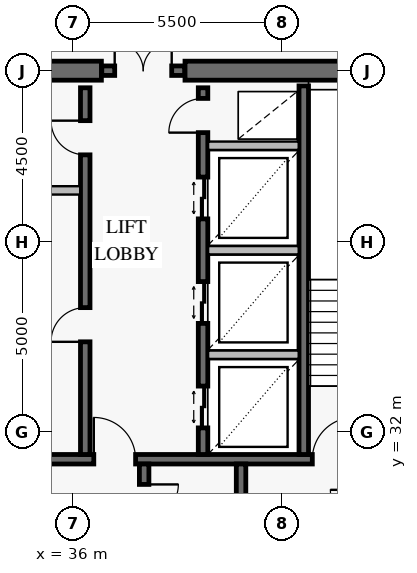
"""IFC4 building model, lengths in metres.
Left out: names, types, materials, properties, quantities, classifications, styles, units other than length and angle.
Written with IfcOpenShell. Run it as: python <this file> out.ifc"""

import sys

from ifc_helpers import new_model, si_unit, direction, frame, frame_2d, origin, place, context, subcontext, project, spatial, rectangle, extrude, element, fill, save


model = new_model("IFC4")
c1 = context("Model", 3, precision=1e-05, world=origin(), true_north=direction((0.0, 1.0)))
c2 = subcontext(c1, "Body", "Model", "MODEL_VIEW")
j1 = project(units=[si_unit("LENGTHUNIT", "METRE"), si_unit("PLANEANGLEUNIT", "RADIAN")], contexts=[c1])
p1 = place(None, origin())
s1 = spatial("IfcSite", under=j1, at=p1, CompositionType="ELEMENT")
p2 = place(p1, origin())
s2 = spatial("IfcBuilding", under=s1, at=p2, CompositionType="ELEMENT")
p3 = place(p2, frame((0.0, 0.0, 319.6)))
s3 = spatial("IfcBuildingStorey", under=s2, at=p3, CompositionType="ELEMENT", Elevation=319.6)
p4 = place(p3, frame((46.75, 41.5, 0.0), z_axis=(0.0, 0.0, 1.0), x_axis=(-1.0, 0.0, 0.0)))
e1 = element("IfcWall", 1, at=p4, inside=s3, PredefinedType="SHEAR", context=c2, shape_type="SweptSolid", body=[
    extrude(rectangle(XDim=7.8, YDim=0.5, at=frame_2d((3.9, 0.0))), origin(), (0.0, 0.0, 1.0), 3.8),
])
p5 = place(p3, frame((36.75, 41.5, 0.0), z_axis=(0.0, 0.0, 1.0), x_axis=(-1.0, 0.0, 0.0)))
e2 = element("IfcWall", 2, at=p5, inside=s3, PredefinedType="SHEAR", context=c2, shape_type="SweptSolid", body=[
    extrude(rectangle(XDim=11.5, YDim=0.5, at=frame_2d((5.75, 0.0))), origin(), (0.0, 0.0, 1.0), 3.8),
])
p6 = place(p5, frame((4.25, 0.0, 0.0)))
e3 = element("IfcOpeningElement", 3, at=p6, cuts=e2, PredefinedType="OPENING", context=c2, shape_type="SweptSolid", body=[
    extrude(rectangle(XDim=1.1, YDim=2.15, at=frame_2d((0.55, 1.075))), frame((0.0, 0.262, 0.0), z_axis=(0.0, -1.0, 0.0), x_axis=(1.0, 0.0, 0.0)), (0.0, 0.0, 1.0), 0.524),
])
p7 = place(p3, frame((36.76, 41.5, 0.0), z_axis=(0.0, 0.0, 1.0), x_axis=(1.0, 0.0, 0.0)))
e4 = element("IfcWall", 4, at=p7, inside=s3, PredefinedType="SOLIDWALL", context=c2, shape_type="SweptSolid", body=[
    extrude(rectangle(XDim=2.18, YDim=0.25, at=frame_2d((1.09, 0.0))), origin(), (0.0, 0.0, 1.0), 3.8),
])
p8 = place(p7, frame((0.34, 0.0, 0.0)))
e5 = element("IfcOpeningElement", 5, at=p8, cuts=e4, PredefinedType="OPENING", context=c2, shape_type="SweptSolid", body=[
    extrude(rectangle(XDim=1.5, YDim=2.15, at=frame_2d((0.75, 1.075))), frame((0.0, 0.137, 0.0), z_axis=(0.0, -1.0, 0.0), x_axis=(1.0, 0.0, 0.0)), (0.0, 0.0, 1.0), 0.274),
])
p9 = place(p3, frame((25.95, 31.275, 0.0), z_axis=(0.0, 0.0, 1.0), x_axis=(1.0, 0.0, 0.0)))
e6 = element("IfcWall", 6, at=p9, inside=s3, PredefinedType="SOLIDWALL", context=c2, shape_type="SweptSolid", body=[
    extrude(rectangle(XDim=20.1, YDim=0.25, at=frame_2d((10.05, 0.0))), origin(), (0.0, 0.0, 1.0), 3.8),
])
p10 = place(p9, frame((2.6, 0.0, 0.0)))
e7 = element("IfcOpeningElement", 7, at=p10, cuts=e6, PredefinedType="OPENING", context=c2, shape_type="SweptSolid", body=[
    extrude(rectangle(XDim=1.1, YDim=2.15, at=frame_2d((0.55, 1.075))), frame((0.0, 0.137, 0.0), z_axis=(0.0, -1.0, 0.0), x_axis=(1.0, 0.0, 0.0)), (0.0, 0.0, 1.0), 0.274),
])
p11 = place(p9, frame((10.6, 0.0, 0.0)))
e8 = element("IfcOpeningElement", 8, at=p11, cuts=e6, PredefinedType="OPENING", context=c2, shape_type="SweptSolid", body=[
    extrude(rectangle(XDim=1.1, YDim=2.15, at=frame_2d((0.55, 1.075))), frame((0.0, 0.137, 0.0), z_axis=(0.0, -1.0, 0.0), x_axis=(1.0, 0.0, 0.0)), (0.0, 0.0, 1.0), 0.274),
])
p12 = place(p9, frame((16.35, 0.0, 0.0)))
e9 = element("IfcOpeningElement", 9, at=p12, cuts=e6, PredefinedType="OPENING", context=c2, shape_type="SweptSolid", body=[
    extrude(rectangle(XDim=1.1, YDim=2.15, at=frame_2d((0.55, 1.075))), frame((0.0, 0.137, 0.0), z_axis=(0.0, -1.0, 0.0), x_axis=(1.0, 0.0, 0.0)), (0.0, 0.0, 1.0), 0.274),
])
p13 = place(p3, frame((42.075, 31.4, 0.0), z_axis=(0.0, 0.0, 1.0), x_axis=(0.0, 1.0, 0.0)))
e10 = element("IfcWall", 10, at=p13, inside=s3, PredefinedType="SOLIDWALL", context=c2, shape_type="SweptSolid", body=[
    extrude(rectangle(XDim=9.7, YDim=0.25, at=frame_2d((4.85, 0.0))), origin(), (0.0, 0.0, 1.0), 3.8),
])
p14 = place(p3, frame((36.325, 31.4, 0.0), z_axis=(0.0, 0.0, 1.0), x_axis=(0.0, 1.0, 0.0)))
e11 = element("IfcWall", 11, at=p14, inside=s3, PredefinedType="SOLIDWALL", context=c2, shape_type="SweptSolid", body=[
    extrude(rectangle(XDim=9.65, YDim=0.25, at=frame_2d((4.825, 0.0))), origin(), (0.0, 0.0, 1.0), 3.8),
])
p15 = place(p14, frame((2.965, 0.0, 0.0)))
e12 = element("IfcOpeningElement", 12, at=p15, cuts=e11, PredefinedType="OPENING", context=c2, shape_type="SweptSolid", body=[
    extrude(rectangle(XDim=0.9, YDim=2.1, at=frame_2d((0.45, 1.05))), frame((0.0, 0.137, 0.0), z_axis=(0.0, -1.0, 0.0), x_axis=(1.0, 0.0, 0.0)), (0.0, 0.0, 1.0), 0.274),
])
p16 = place(p14, frame((7.885, 0.0, 0.0)))
e13 = element("IfcOpeningElement", 13, at=p16, cuts=e11, PredefinedType="OPENING", context=c2, shape_type="SweptSolid", body=[
    extrude(rectangle(XDim=0.9, YDim=2.1, at=frame_2d((0.45, 1.05))), frame((0.0, 0.137, 0.0), z_axis=(0.0, -1.0, 0.0), x_axis=(1.0, 0.0, 0.0)), (0.0, 0.0, 1.0), 0.274),
])
p17 = place(p3, frame((39.425, 31.4, 0.0), z_axis=(0.0, 0.0, 1.0), x_axis=(0.0, 1.0, 0.0)))
e14 = element("IfcWall", 14, at=p17, inside=s3, PredefinedType="SOLIDWALL", context=c2, shape_type="SweptSolid", body=[
    extrude(rectangle(XDim=9.65, YDim=0.25, at=frame_2d((4.825, 0.0))), origin(), (0.0, 0.0, 1.0), 3.8),
])
p18 = place(p17, frame((0.7, 0.0, 0.0)))
e15 = element("IfcOpeningElement", 15, at=p18, cuts=e14, PredefinedType="OPENING", context=c2, shape_type="SweptSolid", body=[
    extrude(rectangle(XDim=1.1, YDim=2.2, at=frame_2d((0.55, 1.1))), frame((0.0, 0.137, 0.0), z_axis=(0.0, -1.0, 0.0), x_axis=(1.0, 0.0, 0.0)), (0.0, 0.0, 1.0), 0.274),
])
p19 = place(p17, frame((3.45, 0.0, 0.0)))
e16 = element("IfcOpeningElement", 16, at=p19, cuts=e14, PredefinedType="OPENING", context=c2, shape_type="SweptSolid", body=[
    extrude(rectangle(XDim=1.1, YDim=2.2, at=frame_2d((0.55, 1.1))), frame((0.0, 0.137, 0.0), z_axis=(0.0, -1.0, 0.0), x_axis=(1.0, 0.0, 0.0)), (0.0, 0.0, 1.0), 0.274),
])
p20 = place(p17, frame((6.2, 0.0, 0.0)))
e17 = element("IfcOpeningElement", 17, at=p20, cuts=e14, PredefinedType="OPENING", context=c2, shape_type="SweptSolid", body=[
    extrude(rectangle(XDim=1.1, YDim=2.2, at=frame_2d((0.55, 1.1))), frame((0.0, 0.137, 0.0), z_axis=(0.0, -1.0, 0.0), x_axis=(1.0, 0.0, 0.0)), (0.0, 0.0, 1.0), 0.274),
])
p21 = place(p17, frame((8.47, 0.0, 0.0)))
e18 = element("IfcOpeningElement", 18, at=p21, cuts=e14, PredefinedType="OPENING", context=c2, shape_type="SweptSolid", body=[
    extrude(rectangle(XDim=0.9, YDim=2.1, at=frame_2d((0.45, 1.05))), frame((0.0, 0.137, 0.0), z_axis=(0.0, -1.0, 0.0), x_axis=(1.0, 0.0, 0.0)), (0.0, 0.0, 1.0), 0.274),
])
p22 = place(p3, frame((37.875, 22.95, 0.0), z_axis=(0.0, 0.0, 1.0), x_axis=(0.0, 1.0, 0.0)))
e19 = element("IfcWall", 19, at=p22, inside=s3, PredefinedType="SOLIDWALL", context=c2, shape_type="SweptSolid", body=[
    extrude(rectangle(XDim=8.2, YDim=0.25, at=frame_2d((4.1, 0.0))), origin(), (0.0, 0.0, 1.0), 3.8),
])
p23 = place(p22, frame((2.562, 0.0, 0.0)))
e20 = element("IfcOpeningElement", 20, at=p23, cuts=e19, PredefinedType="OPENING", context=c2, shape_type="SweptSolid", body=[
    extrude(rectangle(XDim=0.9, YDim=2.1, at=frame_2d((0.45, 1.05))), frame((0.0, 0.137, 0.0), z_axis=(0.0, -1.0, 0.0), x_axis=(1.0, 0.0, 0.0)), (0.0, 0.0, 1.0), 0.274),
])
p24 = place(p22, frame((6.762, 0.0, 0.0)))
e21 = element("IfcOpeningElement", 21, at=p24, cuts=e19, PredefinedType="OPENING", context=c2, shape_type="SweptSolid", body=[
    extrude(rectangle(XDim=0.9, YDim=2.1, at=frame_2d((0.45, 1.05))), frame((0.0, 0.137, 0.0), z_axis=(0.0, -1.0, 0.0), x_axis=(1.0, 0.0, 0.0)), (0.0, 0.0, 1.0), 0.274),
])
p25 = place(p3, frame((40.425, 22.95, 0.0), z_axis=(0.0, 0.0, 1.0), x_axis=(0.0, 1.0, 0.0)))
e22 = element("IfcWall", 22, at=p25, inside=s3, PredefinedType="SOLIDWALL", context=c2, shape_type="SweptSolid", body=[
    extrude(rectangle(XDim=8.2, YDim=0.25, at=frame_2d((4.1, 0.0))), origin(), (0.0, 0.0, 1.0), 3.8),
])
p26 = place(p3, frame((34.108, 38.35, 0.0), z_axis=(0.0, 0.0, 1.0), x_axis=(1.0, 0.0, 0.0)))
e23 = element("IfcWall", 23, at=p26, inside=s3, PredefinedType="PARTITIONING", context=c2, shape_type="SweptSolid", body=[
    extrude(rectangle(XDim=2.084, YDim=0.22, at=frame_2d((1.042, 0.0))), origin(), (0.0, 0.0, 1.0), 3.55),
])
for number, where, z_axis, x_axis in (
    (24, (39.558, 34.025, 0.0), (0.0, 0.0, 1.0), (1.0, 0.0, 0.0)),
    (25, (39.558, 36.775, 0.0), (0.0, 0.0, 1.0), (1.0, 0.0, 0.0)),
    (26, (39.558, 39.525, 0.0), (0.0, 0.0, 1.0), (1.0, 0.0, 0.0)),
):
    element("IfcWall", number, at=place(p3, frame(where, z_axis=z_axis, x_axis=x_axis)), inside=s3, PredefinedType="PARTITIONING", context=c2, shape_type="SweptSolid", body=[
        extrude(rectangle(XDim=2.384, YDim=0.22, at=frame_2d((1.192, 0.0))), origin(), (0.0, 0.0, 1.0), 3.55),
    ])
p27 = place(p8, origin())
e27 = element("IfcDoor", 27, at=p27, inside=s3, OperationType="DOUBLE_DOOR_SINGLE_SWING", PredefinedType="DOOR", context=c2, shape_type="SweptSolid", body=[
    extrude(rectangle(XDim=1.5, YDim=2.15, at=frame_2d((0.75, 1.075))), frame((0.0, 0.025, 0.0), z_axis=(0.0, -1.0, 0.0), x_axis=(1.0, 0.0, 0.0)), (0.0, 0.0, 1.0), 0.05),
])
fill(e5, e27)
p28 = place(p11, origin())
e28 = element("IfcDoor", 28, at=p28, inside=s3, OperationType="SINGLE_SWING_LEFT", PredefinedType="USERDEFINED", context=c2, shape_type="SweptSolid", body=[
    extrude(rectangle(XDim=1.1, YDim=2.15, at=frame_2d((0.55, 1.075))), frame((0.0, 0.025, 0.0), z_axis=(0.0, -1.0, 0.0), x_axis=(1.0, 0.0, 0.0)), (0.0, 0.0, 1.0), 0.05),
])
fill(e8, e28)
p29 = place(p12, origin())
e29 = element("IfcDoor", 29, at=p29, inside=s3, OperationType="SINGLE_SWING_RIGHT", PredefinedType="USERDEFINED", context=c2, shape_type="SweptSolid", body=[
    extrude(rectangle(XDim=1.1, YDim=2.15, at=frame_2d((0.55, 1.075))), frame((0.0, 0.025, 0.0), z_axis=(0.0, -1.0, 0.0), x_axis=(1.0, 0.0, 0.0)), (0.0, 0.0, 1.0), 0.05),
])
fill(e9, e29)
p30 = place(p15, origin())
e30 = element("IfcDoor", 30, at=p30, inside=s3, OperationType="SINGLE_SWING_LEFT", PredefinedType="DOOR", context=c2, shape_type="SweptSolid", body=[
    extrude(rectangle(XDim=0.9, YDim=2.1, at=frame_2d((0.45, 1.05))), frame((0.0, 0.025, 0.0), z_axis=(0.0, -1.0, 0.0), x_axis=(1.0, 0.0, 0.0)), (0.0, 0.0, 1.0), 0.05),
])
fill(e12, e30)
p31 = place(p16, origin())
e31 = element("IfcDoor", 31, at=p31, inside=s3, OperationType="SINGLE_SWING_RIGHT", PredefinedType="DOOR", context=c2, shape_type="SweptSolid", body=[
    extrude(rectangle(XDim=0.9, YDim=2.1, at=frame_2d((0.45, 1.05))), frame((0.0, 0.025, 0.0), z_axis=(0.0, -1.0, 0.0), x_axis=(1.0, 0.0, 0.0)), (0.0, 0.0, 1.0), 0.05),
])
fill(e13, e31)
p32 = place(p18, origin())
e32 = element("IfcDoor", 32, at=p32, inside=s3, OperationType="DOUBLE_DOOR_SLIDING", PredefinedType="DOOR", context=c2, shape_type="SweptSolid", body=[
    extrude(rectangle(XDim=1.1, YDim=2.2, at=frame_2d((0.55, 1.1))), frame((0.0, 0.025, 0.0), z_axis=(0.0, -1.0, 0.0), x_axis=(1.0, 0.0, 0.0)), (0.0, 0.0, 1.0), 0.05),
])
fill(e15, e32)
p33 = place(p19, origin())
e33 = element("IfcDoor", 33, at=p33, inside=s3, OperationType="DOUBLE_DOOR_SLIDING", PredefinedType="DOOR", context=c2, shape_type="SweptSolid", body=[
    extrude(rectangle(XDim=1.1, YDim=2.2, at=frame_2d((0.55, 1.1))), frame((0.0, 0.025, 0.0), z_axis=(0.0, -1.0, 0.0), x_axis=(1.0, 0.0, 0.0)), (0.0, 0.0, 1.0), 0.05),
])
fill(e16, e33)
p34 = place(p20, origin())
e34 = element("IfcDoor", 34, at=p34, inside=s3, OperationType="DOUBLE_DOOR_SLIDING", PredefinedType="DOOR", context=c2, shape_type="SweptSolid", body=[
    extrude(rectangle(XDim=1.1, YDim=2.2, at=frame_2d((0.55, 1.1))), frame((0.0, 0.025, 0.0), z_axis=(0.0, -1.0, 0.0), x_axis=(1.0, 0.0, 0.0)), (0.0, 0.0, 1.0), 0.05),
])
fill(e17, e34)
p35 = place(p21, origin())
e35 = element("IfcDoor", 35, at=p35, inside=s3, OperationType="SINGLE_SWING_LEFT", PredefinedType="DOOR", context=c2, shape_type="SweptSolid", body=[
    extrude(rectangle(XDim=0.9, YDim=2.1, at=frame_2d((0.45, 1.05))), frame((0.0, 0.025, 0.0), z_axis=(0.0, -1.0, 0.0), x_axis=(1.0, 0.0, 0.0)), (0.0, 0.0, 1.0), 0.05),
])
fill(e18, e35)
p36 = place(p24, frame((0.9, 0.0, 0.0), z_axis=(0.0, 0.0, 1.0), x_axis=(-1.0, 0.0, 0.0)))
e36 = element("IfcDoor", 36, at=p36, inside=s3, OperationType="SINGLE_SWING_LEFT", PredefinedType="DOOR", context=c2, shape_type="SweptSolid", body=[
    extrude(rectangle(XDim=0.9, YDim=2.1, at=frame_2d((0.45, 1.05))), frame((0.0, 0.025, 0.0), z_axis=(0.0, -1.0, 0.0), x_axis=(1.0, 0.0, 0.0)), (0.0, 0.0, 1.0), 0.05),
])
fill(e21, e36)
save(model, sys.argv[1])
